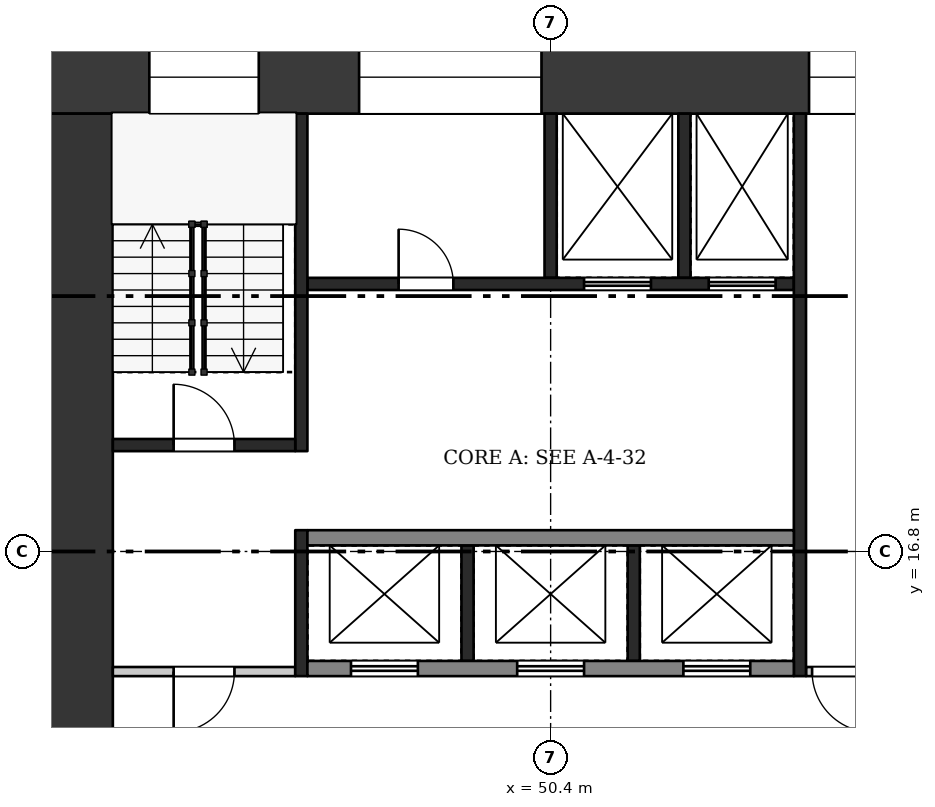
"""IFC4 building model, lengths in metres.
Left out: names, types, materials, properties, quantities, classifications, styles, units other than length and angle.
Written with IfcOpenShell. Run it as: python <this file> out.ifc"""

import sys

from ifc_helpers import new_model, si_unit, direction, frame, frame_2d, origin, place, context, subcontext, project, spatial, rectangle, extrude, element, fill, save


model = new_model("IFC4")
c1 = context("Model", 3, precision=1e-05, world=origin(), true_north=direction((0.0, 1.0)))
c2 = subcontext(c1, "Body", "Model", "MODEL_VIEW")
j1 = project(units=[si_unit("LENGTHUNIT", "METRE"), si_unit("PLANEANGLEUNIT", "RADIAN")], contexts=[c1])
p1 = place(None, origin())
s1 = spatial("IfcSite", under=j1, at=p1, CompositionType="ELEMENT")
p2 = place(p1, origin())
s2 = spatial("IfcBuilding", under=s1, at=p2, CompositionType="ELEMENT")
p3 = place(p2, frame((0.0, 0.0, 235.2)))
s3 = spatial("IfcBuildingStorey", under=s2, at=p3, CompositionType="ELEMENT", Elevation=235.2)
p4 = place(p3, frame((42.0, 24.6, 0.0), z_axis=(0.0, 0.0, 1.0), x_axis=(1.0, 0.0, 0.0)))
e1 = element("IfcWall", 1, at=p4, inside=s3, PredefinedType="SHEAR", context=c2, shape_type="SweptSolid", body=[
    extrude(rectangle(XDim=16.8, YDim=1.2, at=frame_2d((8.4, 0.0))), origin(), (0.0, 0.0, 1.0), 3.22),
])
p5 = place(p4, frame((1.8, 0.0, 0.5)))
e2 = element("IfcOpeningElement", 2, at=p5, cuts=e1, PredefinedType="OPENING", context=c2, shape_type="SweptSolid", body=[
    extrude(rectangle(XDim=1.8, YDim=2.4, at=frame_2d((0.9, 1.2))), frame((0.0, 0.61, 0.0), z_axis=(0.0, -1.0, 0.0), x_axis=(1.0, 0.0, 0.0)), (0.0, 0.0, 1.0), 1.22),
])
p6 = place(p4, frame((5.25, 0.0, 1.6)))
e3 = element("IfcOpeningElement", 3, at=p6, cuts=e1, PredefinedType="OPENING", context=c2, shape_type="SweptSolid", body=[
    extrude(rectangle(XDim=3.0, YDim=1.2, at=frame_2d((1.5, 0.6))), frame((0.0, 0.61, 0.0), z_axis=(0.0, -1.0, 0.0), x_axis=(1.0, 0.0, 0.0)), (0.0, 0.0, 1.0), 1.22),
])
p7 = place(p4, frame((12.65, 0.0, 0.6)))
e4 = element("IfcOpeningElement", 4, at=p7, cuts=e1, PredefinedType="OPENING", context=c2, shape_type="SweptSolid", body=[
    extrude(rectangle(XDim=1.0, YDim=2.1, at=frame_2d((0.5, 1.05))), frame((0.0, 0.61, 0.0), z_axis=(0.0, -1.0, 0.0), x_axis=(1.0, 0.0, 0.0)), (0.0, 0.0, 1.0), 1.22),
])
p8 = place(p4, frame((14.175, 0.0, 1.6)))
e5 = element("IfcOpeningElement", 5, at=p8, cuts=e1, PredefinedType="OPENING", context=c2, shape_type="SweptSolid", body=[
    extrude(rectangle(XDim=1.2, YDim=1.2, at=frame_2d((0.6, 0.6))), frame((0.0, 0.61, 0.0), z_axis=(0.0, -1.0, 0.0), x_axis=(1.0, 0.0, 0.0)), (0.0, 0.0, 1.0), 1.22),
])
p9 = place(p3, frame((42.6, 9.6, 0.0), z_axis=(0.0, 0.0, 1.0), x_axis=(0.0, 1.0, 0.0)))
e6 = element("IfcWall", 6, at=p9, inside=s3, PredefinedType="SHEAR", context=c2, shape_type="SweptSolid", body=[
    extrude(rectangle(XDim=14.4, YDim=1.2, at=frame_2d((7.2, 0.0))), origin(), (0.0, 0.0, 1.0), 3.22),
])
p10 = place(p9, frame((2.1, 0.0, 0.0)))
e7 = element("IfcOpeningElement", 7, at=p10, cuts=e6, PredefinedType="OPENING", context=c2, shape_type="SweptSolid", body=[
    extrude(rectangle(XDim=1.8, YDim=2.1, at=frame_2d((0.9, 1.05))), frame((0.0, 0.61, 0.0), z_axis=(0.0, -1.0, 0.0), x_axis=(1.0, 0.0, 0.0)), (0.0, 0.0, 1.0), 1.22),
])
for number, where, z_axis, x_axis in (
    (8, (49.033, 15.0, 0.0), (0.0, 0.0, 1.0), (0.0, 1.0, 0.0)),
    (9, (51.767, 15.0, 0.0), (0.0, 0.0, 1.0), (0.0, 1.0, 0.0)),
):
    element("IfcWall", number, at=place(p3, frame(where, z_axis=z_axis, x_axis=x_axis)), inside=s3, PredefinedType="SHEAR", context=c2, shape_type="SweptSolid", body=[
        extrude(rectangle(XDim=1.9, YDim=0.2, at=frame_2d((0.95, 0.0))), origin(), (0.0, 0.0, 1.0), 3.22),
    ])
p11 = place(p3, frame((46.4, 14.875, 0.0), z_axis=(0.0, 0.0, 1.0), x_axis=(1.0, 0.0, 0.0)))
e10 = element("IfcWall", 10, at=p11, inside=s3, PredefinedType="SHEAR", context=c2, shape_type="SweptSolid", body=[
    extrude(rectangle(XDim=8.0, YDim=0.25, at=frame_2d((4.0, 0.0))), origin(), (0.0, 0.0, 1.0), 3.22),
])
p12 = place(p11, frame((0.717, 0.0, 0.0)))
e11 = element("IfcOpeningElement", 11, at=p12, cuts=e10, PredefinedType="OPENING", context=c2, shape_type="SweptSolid", body=[
    extrude(rectangle(XDim=1.1, YDim=2.1, at=frame_2d((0.55, 1.05))), frame((0.0, 0.135, 0.0), z_axis=(0.0, -1.0, 0.0), x_axis=(1.0, 0.0, 0.0)), (0.0, 0.0, 1.0), 0.27),
])
p13 = place(p11, frame((3.45, 0.0, 0.0)))
e12 = element("IfcOpeningElement", 12, at=p13, cuts=e10, PredefinedType="OPENING", context=c2, shape_type="SweptSolid", body=[
    extrude(rectangle(XDim=1.1, YDim=2.1, at=frame_2d((0.55, 1.05))), frame((0.0, 0.135, 0.0), z_axis=(0.0, -1.0, 0.0), x_axis=(1.0, 0.0, 0.0)), (0.0, 0.0, 1.0), 0.27),
])
p14 = place(p11, frame((6.183, 0.0, 0.0)))
e13 = element("IfcOpeningElement", 13, at=p14, cuts=e10, PredefinedType="OPENING", context=c2, shape_type="SweptSolid", body=[
    extrude(rectangle(XDim=1.1, YDim=2.1, at=frame_2d((0.55, 1.05))), frame((0.0, 0.135, 0.0), z_axis=(0.0, -1.0, 0.0), x_axis=(1.0, 0.0, 0.0)), (0.0, 0.0, 1.0), 0.27),
])
p15 = place(p3, frame((46.4, 17.025, 0.0), z_axis=(0.0, 0.0, 1.0), x_axis=(1.0, 0.0, 0.0)))
e14 = element("IfcWall", 14, at=p15, inside=s3, PredefinedType="SHEAR", context=c2, shape_type="SweptSolid", body=[
    extrude(rectangle(XDim=8.0, YDim=0.25, at=frame_2d((4.0, 0.0))), origin(), (0.0, 0.0, 1.0), 3.22),
])
for number, where, z_axis, x_axis in (
    (15, (50.4, 21.3, 0.0), (0.0, 0.0, 1.0), (0.0, 1.0, 0.0)),
    (16, (52.6, 21.3, 0.0), (0.0, 0.0, 1.0), (0.0, 1.0, 0.0)),
):
    element("IfcWall", number, at=place(p3, frame(where, z_axis=z_axis, x_axis=x_axis)), inside=s3, PredefinedType="SHEAR", context=c2, shape_type="SweptSolid", body=[
        extrude(rectangle(XDim=2.7, YDim=0.2, at=frame_2d((1.35, 0.0))), origin(), (0.0, 0.0, 1.0), 3.22),
    ])
p16 = place(p3, frame((46.4, 21.2, 0.0), z_axis=(0.0, 0.0, 1.0), x_axis=(1.0, 0.0, 0.0)))
e17 = element("IfcWall", 17, at=p16, inside=s3, PredefinedType="SHEAR", context=c2, shape_type="SweptSolid", body=[
    extrude(rectangle(XDim=8.0, YDim=0.2, at=frame_2d((4.0, 0.0))), origin(), (0.0, 0.0, 1.0), 3.22),
])
p17 = place(p16, frame((1.5, 0.0, 0.0)))
e18 = element("IfcOpeningElement", 18, at=p17, cuts=e17, PredefinedType="OPENING", context=c2, shape_type="SweptSolid", body=[
    extrude(rectangle(XDim=0.9, YDim=2.1, at=frame_2d((0.45, 1.05))), frame((0.0, 0.11, 0.0), z_axis=(0.0, -1.0, 0.0), x_axis=(1.0, 0.0, 0.0)), (0.0, 0.0, 1.0), 0.22),
])
p18 = place(p16, frame((4.55, 0.0, 0.0)))
e19 = element("IfcOpeningElement", 19, at=p18, cuts=e17, PredefinedType="OPENING", context=c2, shape_type="SweptSolid", body=[
    extrude(rectangle(XDim=1.1, YDim=2.1, at=frame_2d((0.55, 1.05))), frame((0.0, 0.11, 0.0), z_axis=(0.0, -1.0, 0.0), x_axis=(1.0, 0.0, 0.0)), (0.0, 0.0, 1.0), 0.22),
])
p19 = place(p16, frame((6.6, 0.0, 0.0)))
e20 = element("IfcOpeningElement", 20, at=p19, cuts=e17, PredefinedType="OPENING", context=c2, shape_type="SweptSolid", body=[
    extrude(rectangle(XDim=1.1, YDim=2.1, at=frame_2d((0.55, 1.05))), frame((0.0, 0.11, 0.0), z_axis=(0.0, -1.0, 0.0), x_axis=(1.0, 0.0, 0.0)), (0.0, 0.0, 1.0), 0.22),
])
p20 = place(p3, frame((46.3, 14.75, 0.0), z_axis=(0.0, 0.0, 1.0), x_axis=(0.0, 1.0, 0.0)))
e21 = element("IfcWall", 21, at=p20, inside=s3, PredefinedType="SHEAR", context=c2, shape_type="SweptSolid", body=[
    extrude(rectangle(XDim=2.4, YDim=0.2, at=frame_2d((1.2, 0.0))), origin(), (0.0, 0.0, 1.0), 3.22),
])
p21 = place(p3, frame((46.3, 18.45, 0.0), z_axis=(0.0, 0.0, 1.0), x_axis=(0.0, 1.0, 0.0)))
e22 = element("IfcWall", 22, at=p21, inside=s3, PredefinedType="SHEAR", context=c2, shape_type="SweptSolid", body=[
    extrude(rectangle(XDim=5.55, YDim=0.2, at=frame_2d((2.775, 0.0))), origin(), (0.0, 0.0, 1.0), 3.22),
])
p22 = place(p3, frame((43.2, 14.825, 0.0), z_axis=(0.0, 0.0, 1.0), x_axis=(1.0, 0.0, 0.0)))
e23 = element("IfcWall", 23, at=p22, inside=s3, PredefinedType="PARTITIONING", context=c2, shape_type="SweptSolid", body=[
    extrude(rectangle(XDim=3.0, YDim=0.15, at=frame_2d((1.5, 0.0))), origin(), (0.0, 0.0, 1.0), 3.22),
])
p23 = place(p22, frame((1.0, 0.0, 0.0)))
e24 = element("IfcOpeningElement", 24, at=p23, cuts=e23, PredefinedType="OPENING", context=c2, shape_type="SweptSolid", body=[
    extrude(rectangle(XDim=1.0, YDim=2.1, at=frame_2d((0.5, 1.05))), frame((0.0, 0.085, 0.0), z_axis=(0.0, -1.0, 0.0), x_axis=(1.0, 0.0, 0.0)), (0.0, 0.0, 1.0), 0.17),
])
p24 = place(p3, frame((43.2, 18.55, 0.0), z_axis=(0.0, 0.0, 1.0), x_axis=(1.0, 0.0, 0.0)))
e25 = element("IfcWall", 25, at=p24, inside=s3, PredefinedType="SHEAR", context=c2, shape_type="SweptSolid", body=[
    extrude(rectangle(XDim=3.0, YDim=0.2, at=frame_2d((1.5, 0.0))), origin(), (0.0, 0.0, 1.0), 3.22),
])
p25 = place(p24, frame((1.0, 0.0, 0.0)))
e26 = element("IfcOpeningElement", 26, at=p25, cuts=e25, PredefinedType="OPENING", context=c2, shape_type="SweptSolid", body=[
    extrude(rectangle(XDim=1.0, YDim=2.1, at=frame_2d((0.5, 1.05))), frame((0.0, 0.11, 0.0), z_axis=(0.0, -1.0, 0.0), x_axis=(1.0, 0.0, 0.0)), (0.0, 0.0, 1.0), 0.22),
])
p26 = place(p3, frame((54.5, 14.75, 0.0), z_axis=(0.0, 0.0, 1.0), x_axis=(0.0, 1.0, 0.0)))
e27 = element("IfcWall", 27, at=p26, inside=s3, PredefinedType="SHEAR", context=c2, shape_type="SweptSolid", body=[
    extrude(rectangle(XDim=9.25, YDim=0.2, at=frame_2d((4.625, 0.0))), origin(), (0.0, 0.0, 1.0), 3.22),
])
p27 = place(p3, frame((54.6, 14.825, 0.0), z_axis=(0.0, 0.0, 1.0), x_axis=(1.0, 0.0, 0.0)))
e28 = element("IfcWall", 28, at=p27, inside=s3, PredefinedType="PARTITIONING", context=c2, shape_type="SweptSolid", body=[
    extrude(rectangle(XDim=3.0, YDim=0.15, at=frame_2d((1.5, 0.0))), origin(), (0.0, 0.0, 1.0), 3.22),
])
p28 = place(p27, frame((0.1, 0.0, 0.0)))
e29 = element("IfcOpeningElement", 29, at=p28, cuts=e28, PredefinedType="OPENING", context=c2, shape_type="SweptSolid", body=[
    extrude(rectangle(XDim=1.0, YDim=2.1, at=frame_2d((0.5, 1.05))), frame((0.0, 0.085, 0.0), z_axis=(0.0, -1.0, 0.0), x_axis=(1.0, 0.0, 0.0)), (0.0, 0.0, 1.0), 0.17),
])
p29 = place(p12, origin())
e30 = element("IfcDoor", 30, at=p29, inside=s3, OperationType="DOUBLE_DOOR_SLIDING", PredefinedType="DOOR", context=c2, shape_type="SweptSolid", body=[
    extrude(rectangle(XDim=1.1, YDim=2.1, at=frame_2d((0.55, 1.05))), frame((0.0, 0.025, 0.0), z_axis=(0.0, -1.0, 0.0), x_axis=(1.0, 0.0, 0.0)), (0.0, 0.0, 1.0), 0.05),
])
fill(e11, e30)
p30 = place(p13, origin())
e31 = element("IfcDoor", 31, at=p30, inside=s3, OperationType="DOUBLE_DOOR_SLIDING", PredefinedType="DOOR", context=c2, shape_type="SweptSolid", body=[
    extrude(rectangle(XDim=1.1, YDim=2.1, at=frame_2d((0.55, 1.05))), frame((0.0, 0.025, 0.0), z_axis=(0.0, -1.0, 0.0), x_axis=(1.0, 0.0, 0.0)), (0.0, 0.0, 1.0), 0.05),
])
fill(e12, e31)
p31 = place(p14, origin())
e32 = element("IfcDoor", 32, at=p31, inside=s3, OperationType="DOUBLE_DOOR_SLIDING", PredefinedType="DOOR", context=c2, shape_type="SweptSolid", body=[
    extrude(rectangle(XDim=1.1, YDim=2.1, at=frame_2d((0.55, 1.05))), frame((0.0, 0.025, 0.0), z_axis=(0.0, -1.0, 0.0), x_axis=(1.0, 0.0, 0.0)), (0.0, 0.0, 1.0), 0.05),
])
fill(e13, e32)
p32 = place(p17, origin())
e33 = element("IfcDoor", 33, at=p32, inside=s3, OperationType="SINGLE_SWING_LEFT", PredefinedType="DOOR", context=c2, shape_type="SweptSolid", body=[
    extrude(rectangle(XDim=0.9, YDim=2.1, at=frame_2d((0.45, 1.05))), frame((0.0, 0.025, 0.0), z_axis=(0.0, -1.0, 0.0), x_axis=(1.0, 0.0, 0.0)), (0.0, 0.0, 1.0), 0.05),
])
fill(e18, e33)
p33 = place(p18, origin())
e34 = element("IfcDoor", 34, at=p33, inside=s3, OperationType="DOUBLE_DOOR_SLIDING", PredefinedType="DOOR", context=c2, shape_type="SweptSolid", body=[
    extrude(rectangle(XDim=1.1, YDim=2.1, at=frame_2d((0.55, 1.05))), frame((0.0, 0.025, 0.0), z_axis=(0.0, -1.0, 0.0), x_axis=(1.0, 0.0, 0.0)), (0.0, 0.0, 1.0), 0.05),
])
fill(e19, e34)
p34 = place(p19, origin())
e35 = element("IfcDoor", 35, at=p34, inside=s3, OperationType="DOUBLE_DOOR_SLIDING", PredefinedType="DOOR", context=c2, shape_type="SweptSolid", body=[
    extrude(rectangle(XDim=1.1, YDim=2.1, at=frame_2d((0.55, 1.05))), frame((0.0, 0.025, 0.0), z_axis=(0.0, -1.0, 0.0), x_axis=(1.0, 0.0, 0.0)), (0.0, 0.0, 1.0), 0.05),
])
fill(e20, e35)
p35 = place(p23, frame((1.0, 0.0, 0.0), z_axis=(0.0, 0.0, 1.0), x_axis=(-1.0, 0.0, 0.0)))
e36 = element("IfcDoor", 36, at=p35, inside=s3, OperationType="SINGLE_SWING_RIGHT", PredefinedType="DOOR", context=c2, shape_type="SweptSolid", body=[
    extrude(rectangle(XDim=1.0, YDim=2.1, at=frame_2d((0.5, 1.05))), frame((0.0, 0.025, 0.0), z_axis=(0.0, -1.0, 0.0), x_axis=(1.0, 0.0, 0.0)), (0.0, 0.0, 1.0), 0.05),
])
fill(e24, e36)
p36 = place(p25, origin())
e37 = element("IfcDoor", 37, at=p36, inside=s3, OperationType="SINGLE_SWING_LEFT", PredefinedType="DOOR", context=c2, shape_type="SweptSolid", body=[
    extrude(rectangle(XDim=1.0, YDim=2.1, at=frame_2d((0.5, 1.05))), frame((0.0, 0.025, 0.0), z_axis=(0.0, -1.0, 0.0), x_axis=(1.0, 0.0, 0.0)), (0.0, 0.0, 1.0), 0.05),
])
fill(e26, e37)
p37 = place(p28, frame((1.0, 0.0, 0.0), z_axis=(0.0, 0.0, 1.0), x_axis=(-1.0, 0.0, 0.0)))
e38 = element("IfcDoor", 38, at=p37, inside=s3, OperationType="SINGLE_SWING_LEFT", PredefinedType="DOOR", context=c2, shape_type="SweptSolid", body=[
    extrude(rectangle(XDim=1.0, YDim=2.1, at=frame_2d((0.5, 1.05))), frame((0.0, 0.025, 0.0), z_axis=(0.0, -1.0, 0.0), x_axis=(1.0, 0.0, 0.0)), (0.0, 0.0, 1.0), 0.05),
])
fill(e29, e38)
p38 = place(p5, origin())
e39 = element("IfcWindow", 39, at=p38, inside=s3, PartitioningType="SINGLE_PANEL", PredefinedType="WINDOW", context=c2, shape_type="SweptSolid", body=[
    extrude(rectangle(XDim=1.8, YDim=2.4, at=frame_2d((0.9, 1.2))), frame((0.0, 0.03, 0.0), z_axis=(0.0, -1.0, 0.0), x_axis=(1.0, 0.0, 0.0)), (0.0, 0.0, 1.0), 0.06),
])
fill(e2, e39)
p39 = place(p6, origin())
e40 = element("IfcWindow", 40, at=p39, inside=s3, PartitioningType="SINGLE_PANEL", PredefinedType="WINDOW", context=c2, shape_type="SweptSolid", body=[
    extrude(rectangle(XDim=3.0, YDim=1.2, at=frame_2d((1.5, 0.6))), frame((0.0, 0.03, 0.0), z_axis=(0.0, -1.0, 0.0), x_axis=(1.0, 0.0, 0.0)), (0.0, 0.0, 1.0), 0.06),
])
fill(e3, e40)
p40 = place(p7, origin())
e41 = element("IfcWindow", 41, at=p40, inside=s3, PartitioningType="SINGLE_PANEL", PredefinedType="WINDOW", context=c2, shape_type="SweptSolid", body=[
    extrude(rectangle(XDim=1.0, YDim=2.1, at=frame_2d((0.5, 1.05))), frame((0.0, 0.03, 0.0), z_axis=(0.0, -1.0, 0.0), x_axis=(1.0, 0.0, 0.0)), (0.0, 0.0, 1.0), 0.06),
])
fill(e4, e41)
save(model, sys.argv[1])
